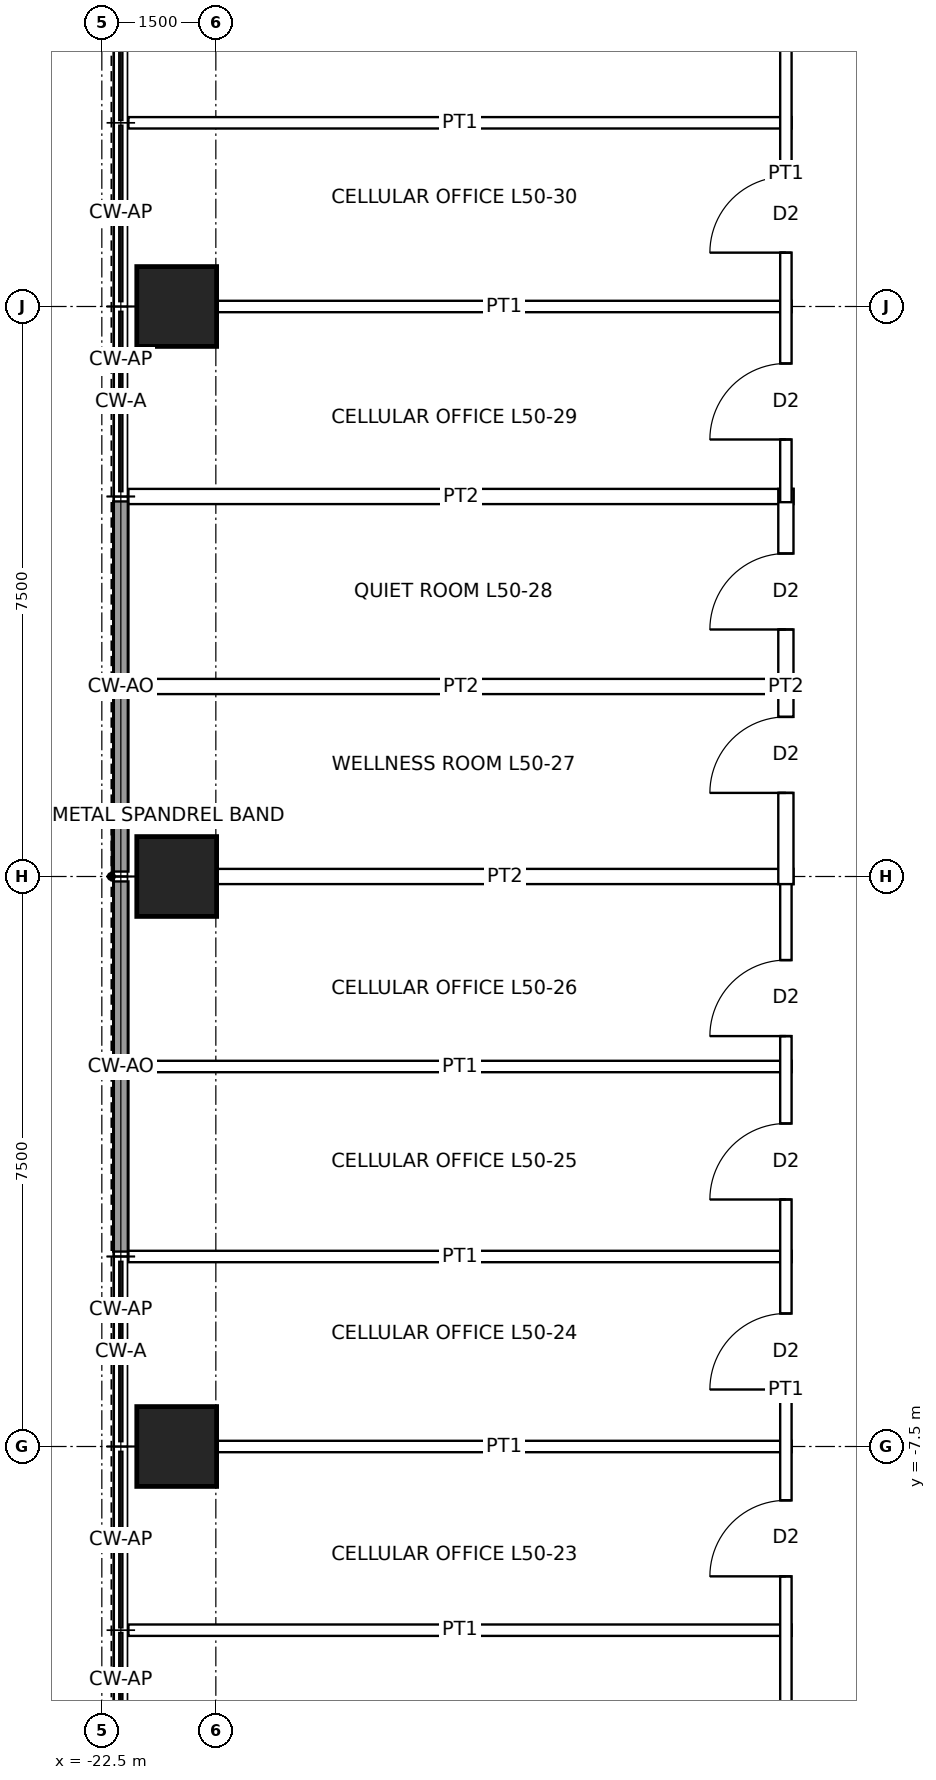
"""IFC4 building model, lengths in metres.
Left out: names, types, materials, properties, quantities, classifications, styles, units other than length and angle.
Written with IfcOpenShell. Run it as: python <this file> out.ifc"""

import sys

from ifc_helpers import new_model, si_unit, direction, frame, frame_2d, origin, origin_2d, place, context, subcontext, project, spatial, rectangle, hollow_rectangle, extrude, element, fill, save


model = new_model("IFC4")
c1 = context("Model", 3, precision=1e-05, world=origin(), true_north=direction((0.0, 1.0)))
c2 = subcontext(c1, "Body", "Model", "MODEL_VIEW")
j1 = project(units=[si_unit("LENGTHUNIT", "METRE"), si_unit("PLANEANGLEUNIT", "RADIAN")], contexts=[c1])
p1 = place(None, origin())
s1 = spatial("IfcSite", under=j1, at=p1, CompositionType="ELEMENT")
p2 = place(p1, origin())
s2 = spatial("IfcBuilding", under=s1, at=p2, CompositionType="ELEMENT")
p3 = place(p2, frame((0.0, 0.0, 233.9)))
s3 = spatial("IfcBuildingStorey", under=s2, at=p3, CompositionType="ELEMENT", Elevation=233.9)
for number, where, z_axis, x_axis in (
    (1, (-21.515, -7.5, 0.0), (0.0, 0.0, 1.0), (1.0, 0.0, 0.0)),
    (2, (-21.515, 0.0, 0.0), (0.0, 0.0, 1.0), (1.0, 0.0, 0.0)),
    (3, (-21.515, 7.5, 0.0), (0.0, 0.0, 1.0), (1.0, 0.0, 0.0)),
):
    element("IfcColumn", number, at=place(p3, frame(where, z_axis=z_axis, x_axis=x_axis)), inside=s3, PredefinedType="COLUMN", context=c2, shape_type="SweptSolid", body=[
        extrude(hollow_rectangle(XDim=1.05, YDim=1.05, WallThickness=0.07, at=origin_2d()), origin(), (0.0, 0.0, 1.0), 4.0),
    ])
for number, where, z_axis, x_axis in (
    (4, (-22.25, -4.935, 0.0), (0.0, 0.0, 1.0), (0.0, 1.0, 0.0)),
    (5, (-22.25, -2.468, 0.0), (0.0, 0.0, 1.0), (0.0, 1.0, 0.0)),
    (6, (-22.25, 0.065, 0.0), (0.0, 0.0, 1.0), (0.0, 1.0, 0.0)),
    (7, (-22.25, 2.532, 0.0), (0.0, 0.0, 1.0), (0.0, 1.0, 0.0)),
):
    element("IfcWall", number, at=place(p3, frame(where, z_axis=z_axis, x_axis=x_axis)), inside=s3, PredefinedType="SOLIDWALL", context=c2, shape_type="SweptSolid", body=[
        extrude(rectangle(XDim=2.403, YDim=0.2, at=frame_2d((1.201, 0.0))), origin(), (0.0, 0.0, 1.0), 3.85),
    ])
p4 = place(p3, frame((-22.15, -9.917, 0.0), z_axis=(0.0, 0.0, 1.0), x_axis=(1.0, 0.0, 0.0)))
e8 = element("IfcWall", 8, at=p4, inside=s3, PredefinedType="PARTITIONING", context=c2, shape_type="SweptSolid", body=[
    extrude(rectangle(XDim=8.725, YDim=0.15, at=frame_2d((4.362, 0.0))), origin(), (0.0, 0.0, 1.0), 3.85),
])
p5 = place(p3, frame((-20.99, -7.5, 0.0), z_axis=(0.0, 0.0, 1.0), x_axis=(1.0, 0.0, 0.0)))
e9 = element("IfcWall", 9, at=p5, inside=s3, PredefinedType="PARTITIONING", context=c2, shape_type="SweptSolid", body=[
    extrude(rectangle(XDim=7.565, YDim=0.15, at=frame_2d((3.782, 0.0))), origin(), (0.0, 0.0, 1.0), 3.238),
])
for number, where, z_axis, x_axis in (
    (10, (-22.15, -5.0, 0.0), (0.0, 0.0, 1.0), (1.0, 0.0, 0.0)),
    (11, (-22.15, -2.5, 0.0), (0.0, 0.0, 1.0), (1.0, 0.0, 0.0)),
):
    element("IfcWall", number, at=place(p3, frame(where, z_axis=z_axis, x_axis=x_axis)), inside=s3, PredefinedType="PARTITIONING", context=c2, shape_type="SweptSolid", body=[
        extrude(rectangle(XDim=8.725, YDim=0.15, at=frame_2d((4.362, 0.0))), origin(), (0.0, 0.0, 1.0), 3.85),
    ])
p6 = place(p3, frame((-20.99, 0.0, 0.0), z_axis=(0.0, 0.0, 1.0), x_axis=(1.0, 0.0, 0.0)))
e12 = element("IfcWall", 12, at=p6, inside=s3, PredefinedType="PARTITIONING", context=c2, shape_type="SweptSolid", body=[
    extrude(rectangle(XDim=7.59, YDim=0.2, at=frame_2d((3.795, 0.0))), origin(), (0.0, 0.0, 1.0), 3.238),
])
for number, where, z_axis, x_axis in (
    (13, (-22.15, 2.5, 0.0), (0.0, 0.0, 1.0), (1.0, 0.0, 0.0)),
    (14, (-22.15, 5.0, 0.0), (0.0, 0.0, 1.0), (1.0, 0.0, 0.0)),
):
    element("IfcWall", number, at=place(p3, frame(where, z_axis=z_axis, x_axis=x_axis)), inside=s3, PredefinedType="PARTITIONING", context=c2, shape_type="SweptSolid", body=[
        extrude(rectangle(XDim=8.75, YDim=0.2, at=frame_2d((4.375, 0.0))), origin(), (0.0, 0.0, 1.0), 3.85),
    ])
p7 = place(p3, frame((-20.99, 7.5, 0.0), z_axis=(0.0, 0.0, 1.0), x_axis=(1.0, 0.0, 0.0)))
e15 = element("IfcWall", 15, at=p7, inside=s3, PredefinedType="PARTITIONING", context=c2, shape_type="SweptSolid", body=[
    extrude(rectangle(XDim=7.565, YDim=0.15, at=frame_2d((3.782, 0.0))), origin(), (0.0, 0.0, 1.0), 3.238),
])
p8 = place(p3, frame((-22.15, 9.917, 0.0), z_axis=(0.0, 0.0, 1.0), x_axis=(1.0, 0.0, 0.0)))
e16 = element("IfcWall", 16, at=p8, inside=s3, PredefinedType="PARTITIONING", context=c2, shape_type="SweptSolid", body=[
    extrude(rectangle(XDim=8.725, YDim=0.15, at=frame_2d((4.362, 0.0))), origin(), (0.0, 0.0, 1.0), 3.85),
])
p9 = place(p3, frame((-13.5, -13.575, 0.0), z_axis=(0.0, 0.0, 1.0), x_axis=(0.0, 1.0, 0.0)))
e17 = element("IfcWall", 17, at=p9, inside=s3, PredefinedType="PARTITIONING", context=c2, shape_type="SweptSolid", body=[
    extrude(rectangle(XDim=13.65, YDim=0.15, at=frame_2d((6.825, 0.0))), origin(), (0.0, 0.0, 1.0), 3.85),
])
p10 = place(p9, frame((4.366, 0.0, 0.0)))
e18 = element("IfcOpeningElement", 18, at=p10, cuts=e17, PredefinedType="OPENING", context=c2, shape_type="SweptSolid", body=[
    extrude(rectangle(XDim=1.0, YDim=2.1, at=frame_2d((0.5, 1.05))), frame((0.0, 0.085, 0.0), z_axis=(0.0, -1.0, 0.0), x_axis=(1.0, 0.0, 0.0)), (0.0, 0.0, 1.0), 0.17),
])
p11 = place(p9, frame((6.825, 0.0, 0.0)))
e19 = element("IfcOpeningElement", 19, at=p11, cuts=e17, PredefinedType="OPENING", context=c2, shape_type="SweptSolid", body=[
    extrude(rectangle(XDim=1.0, YDim=2.1, at=frame_2d((0.5, 1.05))), frame((0.0, 0.085, 0.0), z_axis=(0.0, -1.0, 0.0), x_axis=(1.0, 0.0, 0.0)), (0.0, 0.0, 1.0), 0.17),
])
p12 = place(p9, frame((9.325, 0.0, 0.0)))
e20 = element("IfcOpeningElement", 20, at=p12, cuts=e17, PredefinedType="OPENING", context=c2, shape_type="SweptSolid", body=[
    extrude(rectangle(XDim=1.0, YDim=2.1, at=frame_2d((0.5, 1.05))), frame((0.0, 0.085, 0.0), z_axis=(0.0, -1.0, 0.0), x_axis=(1.0, 0.0, 0.0)), (0.0, 0.0, 1.0), 0.17),
])
p13 = place(p9, frame((11.475, 0.0, 0.0)))
e21 = element("IfcOpeningElement", 21, at=p13, cuts=e17, PredefinedType="OPENING", context=c2, shape_type="SweptSolid", body=[
    extrude(rectangle(XDim=1.0, YDim=2.1, at=frame_2d((0.5, 1.05))), frame((0.0, 0.085, 0.0), z_axis=(0.0, -1.0, 0.0), x_axis=(1.0, 0.0, 0.0)), (0.0, 0.0, 1.0), 0.17),
])
p14 = place(p3, frame((-13.5, -0.1, 0.0), z_axis=(0.0, 0.0, 1.0), x_axis=(0.0, 1.0, 0.0)))
e22 = element("IfcWall", 22, at=p14, inside=s3, PredefinedType="PARTITIONING", context=c2, shape_type="SweptSolid", body=[
    extrude(rectangle(XDim=5.2, YDim=0.2, at=frame_2d((2.6, 0.0))), origin(), (0.0, 0.0, 1.0), 3.85),
])
p15 = place(p14, frame((1.2, 0.0, 0.0)))
e23 = element("IfcOpeningElement", 23, at=p15, cuts=e22, PredefinedType="OPENING", context=c2, shape_type="SweptSolid", body=[
    extrude(rectangle(XDim=1.0, YDim=2.1, at=frame_2d((0.5, 1.05))), frame((0.0, 0.11, 0.0), z_axis=(0.0, -1.0, 0.0), x_axis=(1.0, 0.0, 0.0)), (0.0, 0.0, 1.0), 0.22),
])
p16 = place(p14, frame((3.35, 0.0, 0.0)))
e24 = element("IfcOpeningElement", 24, at=p16, cuts=e22, PredefinedType="OPENING", context=c2, shape_type="SweptSolid", body=[
    extrude(rectangle(XDim=1.0, YDim=2.1, at=frame_2d((0.5, 1.05))), frame((0.0, 0.11, 0.0), z_axis=(0.0, -1.0, 0.0), x_axis=(1.0, 0.0, 0.0)), (0.0, 0.0, 1.0), 0.22),
])
p17 = place(p3, frame((-13.5, 4.925, 0.0), z_axis=(0.0, 0.0, 1.0), x_axis=(0.0, 1.0, 0.0)))
e25 = element("IfcWall", 25, at=p17, inside=s3, PredefinedType="PARTITIONING", context=c2, shape_type="SweptSolid", body=[
    extrude(rectangle(XDim=8.65, YDim=0.15, at=frame_2d((4.325, 0.0))), origin(), (0.0, 0.0, 1.0), 3.85),
])
p18 = place(p17, frame((0.825, 0.0, 0.0)))
e26 = element("IfcOpeningElement", 26, at=p18, cuts=e25, PredefinedType="OPENING", context=c2, shape_type="SweptSolid", body=[
    extrude(rectangle(XDim=1.0, YDim=2.1, at=frame_2d((0.5, 1.05))), frame((0.0, 0.085, 0.0), z_axis=(0.0, -1.0, 0.0), x_axis=(1.0, 0.0, 0.0)), (0.0, 0.0, 1.0), 0.17),
])
p19 = place(p17, frame((3.283, 0.0, 0.0)))
e27 = element("IfcOpeningElement", 27, at=p19, cuts=e25, PredefinedType="OPENING", context=c2, shape_type="SweptSolid", body=[
    extrude(rectangle(XDim=1.0, YDim=2.1, at=frame_2d((0.5, 1.05))), frame((0.0, 0.085, 0.0), z_axis=(0.0, -1.0, 0.0), x_axis=(1.0, 0.0, 0.0)), (0.0, 0.0, 1.0), 0.17),
])
p20 = place(p10, origin())
e28 = element("IfcDoor", 28, at=p20, inside=s3, OperationType="SINGLE_SWING_LEFT", PredefinedType="DOOR", context=c2, shape_type="SweptSolid", body=[
    extrude(rectangle(XDim=1.0, YDim=2.1, at=frame_2d((0.5, 1.05))), frame((0.0, 0.025, 0.0), z_axis=(0.0, -1.0, 0.0), x_axis=(1.0, 0.0, 0.0)), (0.0, 0.0, 1.0), 0.05),
])
fill(e18, e28)
p21 = place(p11, origin())
e29 = element("IfcDoor", 29, at=p21, inside=s3, OperationType="SINGLE_SWING_LEFT", PredefinedType="DOOR", context=c2, shape_type="SweptSolid", body=[
    extrude(rectangle(XDim=1.0, YDim=2.1, at=frame_2d((0.5, 1.05))), frame((0.0, 0.025, 0.0), z_axis=(0.0, -1.0, 0.0), x_axis=(1.0, 0.0, 0.0)), (0.0, 0.0, 1.0), 0.05),
])
fill(e19, e29)
p22 = place(p12, origin())
e30 = element("IfcDoor", 30, at=p22, inside=s3, OperationType="SINGLE_SWING_LEFT", PredefinedType="DOOR", context=c2, shape_type="SweptSolid", body=[
    extrude(rectangle(XDim=1.0, YDim=2.1, at=frame_2d((0.5, 1.05))), frame((0.0, 0.025, 0.0), z_axis=(0.0, -1.0, 0.0), x_axis=(1.0, 0.0, 0.0)), (0.0, 0.0, 1.0), 0.05),
])
fill(e20, e30)
p23 = place(p13, origin())
e31 = element("IfcDoor", 31, at=p23, inside=s3, OperationType="SINGLE_SWING_LEFT", PredefinedType="DOOR", context=c2, shape_type="SweptSolid", body=[
    extrude(rectangle(XDim=1.0, YDim=2.1, at=frame_2d((0.5, 1.05))), frame((0.0, 0.025, 0.0), z_axis=(0.0, -1.0, 0.0), x_axis=(1.0, 0.0, 0.0)), (0.0, 0.0, 1.0), 0.05),
])
fill(e21, e31)
p24 = place(p15, origin())
e32 = element("IfcDoor", 32, at=p24, inside=s3, OperationType="SINGLE_SWING_LEFT", PredefinedType="DOOR", context=c2, shape_type="SweptSolid", body=[
    extrude(rectangle(XDim=1.0, YDim=2.1, at=frame_2d((0.5, 1.05))), frame((0.0, 0.025, 0.0), z_axis=(0.0, -1.0, 0.0), x_axis=(1.0, 0.0, 0.0)), (0.0, 0.0, 1.0), 0.05),
])
fill(e23, e32)
p25 = place(p16, origin())
e33 = element("IfcDoor", 33, at=p25, inside=s3, OperationType="SINGLE_SWING_LEFT", PredefinedType="DOOR", context=c2, shape_type="SweptSolid", body=[
    extrude(rectangle(XDim=1.0, YDim=2.1, at=frame_2d((0.5, 1.05))), frame((0.0, 0.025, 0.0), z_axis=(0.0, -1.0, 0.0), x_axis=(1.0, 0.0, 0.0)), (0.0, 0.0, 1.0), 0.05),
])
fill(e24, e33)
p26 = place(p18, origin())
e34 = element("IfcDoor", 34, at=p26, inside=s3, OperationType="SINGLE_SWING_LEFT", PredefinedType="DOOR", context=c2, shape_type="SweptSolid", body=[
    extrude(rectangle(XDim=1.0, YDim=2.1, at=frame_2d((0.5, 1.05))), frame((0.0, 0.025, 0.0), z_axis=(0.0, -1.0, 0.0), x_axis=(1.0, 0.0, 0.0)), (0.0, 0.0, 1.0), 0.05),
])
fill(e26, e34)
p27 = place(p19, origin())
e35 = element("IfcDoor", 35, at=p27, inside=s3, OperationType="SINGLE_SWING_LEFT", PredefinedType="DOOR", context=c2, shape_type="SweptSolid", body=[
    extrude(rectangle(XDim=1.0, YDim=2.1, at=frame_2d((0.5, 1.05))), frame((0.0, 0.025, 0.0), z_axis=(0.0, -1.0, 0.0), x_axis=(1.0, 0.0, 0.0)), (0.0, 0.0, 1.0), 0.05),
])
fill(e27, e35)
save(model, sys.argv[1])
